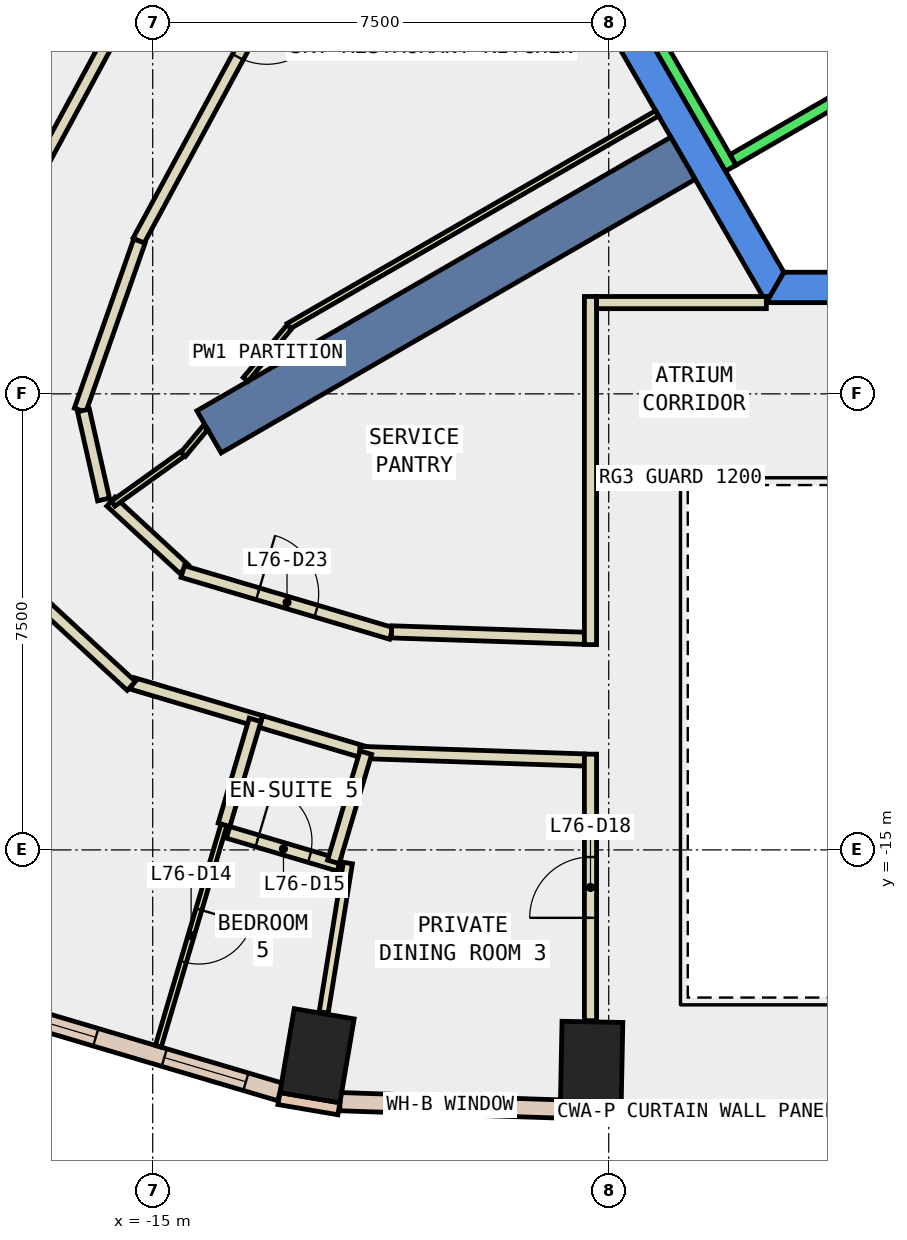
"""IFC4 building model, lengths in metres.
Left out: names, types, materials, properties, quantities, classifications, styles, units other than length and angle.
Written with IfcOpenShell. Run it as: python <this file> out.ifc"""

import sys

from ifc_helpers import new_model, si_unit, direction, frame, frame_2d, origin, origin_2d, place, context, subcontext, project, spatial, polyline, rectangle, outline, extrude, element, fill, save


model = new_model("IFC4")
c1 = context("Model", 3, precision=1e-05, world=origin(), true_north=direction((0.0, 1.0)))
c2 = subcontext(c1, "Body", "Model", "MODEL_VIEW")
j1 = project(units=[si_unit("LENGTHUNIT", "METRE"), si_unit("PLANEANGLEUNIT", "RADIAN")], contexts=[c1])
p1 = place(None, origin())
s1 = spatial("IfcSite", under=j1, at=p1, CompositionType="ELEMENT")
p2 = place(p1, origin())
s2 = spatial("IfcBuilding", under=s1, at=p2, CompositionType="ELEMENT")
p3 = place(p2, frame((0.0, 0.0, 322.4)))
s3 = spatial("IfcBuildingStorey", under=s2, at=p3, CompositionType="ELEMENT", Elevation=322.4)
for number, where, z_axis, x_axis in (
    (1, (-12.297, -18.385, -0.34), (0.0, 0.0, 1.0), (-0.986, 0.168, 0.0)),
    (2, (-7.782, -18.528, -0.34), (0.0, 0.0, 1.0), (-1.0, 0.02, 0.0)),
):
    element("IfcColumn", number, at=place(p3, frame(where, z_axis=z_axis, x_axis=x_axis)), inside=s3, PredefinedType="COLUMN", context=c2, shape_type="SweptSolid", body=[
        extrude(rectangle(XDim=1.0, YDim=1.4, at=origin_2d()), origin(), (0.0, 0.0, 1.0), 3.34),
    ])
p4 = place(p3, frame((0.0, 0.0, -0.34)))
e3 = element("IfcWall", 3, at=p4, inside=s3, PredefinedType="SHEAR", context=c2, shape_type="SweptSolid", body=[
    extrude(outline(polyline([(-9.815, 2.5), (-4.907, -6.0), (-4.619, -5.5), (-9.238, 2.5), (-9.815, 2.5)])), origin(), (0.0, 0.0, 1.0), 3.34),
])
p5 = place(p3, frame((0.0, 0.0, -0.34)))
e4 = element("IfcWall", 4, at=p5, inside=s3, PredefinedType="SHEAR", context=c2, shape_type="SweptSolid", body=[
    extrude(outline(polyline([(3.75, -6.0), (3.75, -5.5), (-4.619, -5.5), (-4.907, -6.0), (3.75, -6.0)])), origin(), (0.0, 0.0, 1.0), 3.34),
])
p6 = place(p3, frame((-6.279, -3.625, -0.34), z_axis=(0.0, 0.0, 1.0), x_axis=(-0.866017533419, -0.500013631625, 0.0)))
e5 = element("IfcWall", 5, at=p6, inside=s3, PredefinedType="SHEAR", context=c2, shape_type="SweptSolid", body=[
    extrude(rectangle(XDim=9.0, YDim=0.8, at=frame_2d((4.5, 0.0))), origin(), (0.0, 0.0, 1.0), 3.34),
])
for number, where, z_axis, x_axis in (
    (6, (-12.924, -19.089, 0.0), (0.0, 0.0, 1.0), (0.986, -0.168, 0.0)),
    (7, (-8.298, -19.318, 0.0), (0.0, 0.0, 1.0), (1.0, -0.02, 0.0)),
):
    element("IfcWall", number, at=place(p3, frame(where, z_axis=z_axis, x_axis=x_axis)), inside=s3, PredefinedType="STANDARD", context=c2, shape_type="SweptSolid", body=[
        extrude(rectangle(XDim=1.0, YDim=0.2, at=frame_2d((0.5, 0.0))), origin(), (0.0, 0.0, 1.0), 3.0),
    ])
p7 = place(p3, frame((-11.919, -19.14, 0.0), z_axis=(0.0, 0.0, 1.0), x_axis=(0.999441913039, -0.033404527552, 0.0)))
e8 = element("IfcWall", 8, at=p7, inside=s3, PredefinedType="STANDARD", context=c2, shape_type="SweptSolid", body=[
    extrude(rectangle(XDim=3.625, YDim=0.3, at=frame_2d((1.812, 0.0))), origin(), (0.0, 0.0, 1.0), 3.0),
])
p8 = place(p7, frame((1.113, 0.0, 0.9)))
e9 = element("IfcOpeningElement", 9, at=p8, cuts=e8, PredefinedType="OPENING", context=c2, shape_type="SweptSolid", body=[
    extrude(rectangle(XDim=1.4, YDim=2.0, at=frame_2d((0.7, 1.0))), frame((0.0, 0.16, 0.0), z_axis=(0.0, -1.0, 0.0), x_axis=(1.0, 0.0, 0.0)), (0.0, 0.0, 1.0), 0.32),
])
p9 = place(p3, frame((-17.842, -17.516, 0.0), z_axis=(0.0, 0.0, 1.0), x_axis=(0.958757933751, -0.284223898486, 0.0)))
e10 = element("IfcWall", 10, at=p9, inside=s3, PredefinedType="STANDARD", context=c2, shape_type="SweptSolid", body=[
    extrude(rectangle(XDim=5.15, YDim=0.3, at=frame_2d((2.575, 0.0))), origin(), (0.0, 0.0, 1.0), 3.0),
])
p10 = place(p9, frame((0.588, 0.0, 0.9)))
e11 = element("IfcOpeningElement", 11, at=p10, cuts=e10, PredefinedType="OPENING", context=c2, shape_type="SweptSolid", body=[
    extrude(rectangle(XDim=1.4, YDim=2.0, at=frame_2d((0.7, 1.0))), frame((0.0, 0.16, 0.0), z_axis=(0.0, -1.0, 0.0), x_axis=(1.0, 0.0, 0.0)), (0.0, 0.0, 1.0), 0.32),
])
p11 = place(p9, frame((3.163, 0.0, 0.9)))
e12 = element("IfcOpeningElement", 12, at=p11, cuts=e10, PredefinedType="OPENING", context=c2, shape_type="SweptSolid", body=[
    extrude(rectangle(XDim=1.4, YDim=2.0, at=frame_2d((0.7, 1.0))), frame((0.0, 0.16, 0.0), z_axis=(0.0, -1.0, 0.0), x_axis=(1.0, 0.0, 0.0)), (0.0, 0.0, 1.0), 0.32),
])
p12 = place(p3, frame((-11.489, 1.942, 0.0), z_axis=(0.0, 0.0, 1.0), x_axis=(-0.475643534049, -0.879638123615, 0.0)))
e13 = element("IfcWall", 13, at=p12, inside=s3, PredefinedType="PARTITIONING", context=c2, shape_type="SweptSolid", body=[
    extrude(rectangle(XDim=7.871, YDim=0.2, at=frame_2d((3.936, 0.0))), origin(), (0.0, 0.0, 1.0), 3.0),
])
p13 = place(p12, frame((3.436, 0.0, 0.0)))
e14 = element("IfcOpeningElement", 14, at=p13, cuts=e13, PredefinedType="OPENING", context=c2, shape_type="SweptSolid", body=[
    extrude(rectangle(XDim=1.0, YDim=2.1, at=frame_2d((0.5, 1.05))), frame((0.0, 0.11, 0.0), z_axis=(0.0, -1.0, 0.0), x_axis=(1.0, 0.0, 0.0)), (0.0, 0.0, 1.0), 0.22),
])
p14 = place(p3, frame((-15.219, -4.988, 0.0), z_axis=(0.0, 0.0, 1.0), x_axis=(-0.330981563235, -0.943637220969, 0.0)))
e15 = element("IfcWall", 15, at=p14, inside=s3, PredefinedType="PARTITIONING", context=c2, shape_type="SweptSolid", body=[
    extrude(rectangle(XDim=2.946, YDim=0.2, at=frame_2d((1.473, 0.0))), origin(), (0.0, 0.0, 1.0), 3.0),
])
p15 = place(p3, frame((-16.139, -7.772, 0.0), z_axis=(0.0, 0.0, 1.0), x_axis=(0.220111291919, -0.975474766034, 0.0)))
e16 = element("IfcWall", 16, at=p15, inside=s3, PredefinedType="PARTITIONING", context=c2, shape_type="SweptSolid", body=[
    extrude(rectangle(XDim=1.503, YDim=0.2, at=frame_2d((0.751, 0.0))), origin(), (0.0, 0.0, 1.0), 3.0),
])
p16 = place(p3, frame((-15.687, -9.272, 0.0), z_axis=(0.0, 0.0, 1.0), x_axis=(0.734946370973, -0.67812523312, 0.0)))
e17 = element("IfcWall", 17, at=p16, inside=s3, PredefinedType="PARTITIONING", context=c2, shape_type="SweptSolid", body=[
    extrude(rectangle(XDim=1.637, YDim=0.2, at=frame_2d((0.818, 0.0))), origin(), (0.0, 0.0, 1.0), 3.0),
])
p17 = place(p3, frame((-14.506, -10.422, 0.0), z_axis=(0.0, 0.0, 1.0), x_axis=(0.958760241353, -0.284216114252, 0.0)))
e18 = element("IfcWall", 18, at=p17, inside=s3, PredefinedType="PARTITIONING", context=c2, shape_type="SweptSolid", body=[
    extrude(rectangle(XDim=3.578, YDim=0.2, at=frame_2d((1.789, 0.0))), origin(), (0.0, 0.0, 1.0), 3.0),
])
p18 = place(p17, frame((1.289, 0.0, 0.0)))
e19 = element("IfcOpeningElement", 19, at=p18, cuts=e18, PredefinedType="OPENING", context=c2, shape_type="SweptSolid", body=[
    extrude(rectangle(XDim=1.0, YDim=2.1, at=frame_2d((0.5, 1.05))), frame((0.0, 0.11, 0.0), z_axis=(0.0, -1.0, 0.0), x_axis=(1.0, 0.0, 0.0)), (0.0, 0.0, 1.0), 0.22),
])
p19 = place(p3, frame((-11.072, -11.414, 0.0), z_axis=(0.0, 0.0, 1.0), x_axis=(0.999442599499, -0.033383982774, 0.0)))
e20 = element("IfcWall", 20, at=p19, inside=s3, PredefinedType="PARTITIONING", context=c2, shape_type="SweptSolid", body=[
    extrude(rectangle(XDim=3.174, YDim=0.2, at=frame_2d((1.587, 0.0))), origin(), (0.0, 0.0, 1.0), 3.0),
])
p20 = place(p3, frame((-17.068, -4.17, 0.0), z_axis=(0.0, 0.0, 1.0), x_axis=(0.475681790703, 0.879617436158, 0.0)))
e21 = element("IfcWall", 21, at=p20, inside=s3, PredefinedType="PARTITIONING", context=c2, shape_type="SweptSolid", body=[
    extrude(rectangle(XDim=8.058, YDim=0.2, at=frame_2d((4.029, 0.0))), origin(), (0.0, 0.0, 1.0), 3.0),
])
p21 = place(p20, frame((3.529, 0.0, 0.0)))
e22 = element("IfcOpeningElement", 22, at=p21, cuts=e21, PredefinedType="OPENING", context=c2, shape_type="SweptSolid", body=[
    extrude(rectangle(XDim=1.0, YDim=2.1, at=frame_2d((0.5, 1.05))), frame((0.0, 0.11, 0.0), z_axis=(0.0, -1.0, 0.0), x_axis=(1.0, 0.0, 0.0)), (0.0, 0.0, 1.0), 0.22),
])
p22 = place(p3, frame((-13.22, -12.889, 0.0), z_axis=(0.0, 0.0, 1.0), x_axis=(-0.958789155152, 0.284118559693, 0.0)))
e23 = element("IfcWall", 23, at=p22, inside=s3, PredefinedType="PARTITIONING", context=c2, shape_type="SweptSolid", body=[
    extrude(rectangle(XDim=2.2, YDim=0.2, at=frame_2d((1.1, 0.0))), origin(), (0.0, 0.0, 1.0), 3.0),
])
p23 = place(p3, frame((-15.352, -12.303, 0.0), z_axis=(0.0, 0.0, 1.0), x_axis=(-0.734786003021, 0.67829899732, 0.0)))
e24 = element("IfcWall", 24, at=p23, inside=s3, PredefinedType="PARTITIONING", context=c2, shape_type="SweptSolid", body=[
    extrude(rectangle(XDim=3.22, YDim=0.2, at=frame_2d((1.61, 0.0))), origin(), (0.0, 0.0, 1.0), 3.0),
])
p24 = place(p3, frame((-11.495, -13.401, 0.0), z_axis=(0.0, 0.0, 1.0), x_axis=(-0.958662482938, 0.284545679649, 0.0)))
e25 = element("IfcWall", 25, at=p24, inside=s3, PredefinedType="PARTITIONING", context=c2, shape_type="SweptSolid", body=[
    extrude(rectangle(XDim=1.799, YDim=0.2, at=frame_2d((0.9, 0.0))), origin(), (0.0, 0.0, 1.0), 3.0),
])
p25 = place(p3, frame((-7.9, -13.521, 0.0), z_axis=(0.0, 0.0, 1.0), x_axis=(-0.999437184802, 0.033545694739, 0.0)))
e26 = element("IfcWall", 26, at=p25, inside=s3, PredefinedType="PARTITIONING", context=c2, shape_type="SweptSolid", body=[
    extrude(rectangle(XDim=3.697, YDim=0.2, at=frame_2d((1.849, 0.0))), origin(), (0.0, 0.0, 1.0), 3.0),
])
p26 = place(p3, frame((-7.8, -11.624, 0.0), z_axis=(0.0, 0.0, 1.0), x_axis=(0.0, 1.0, 0.0)))
e27 = element("IfcWall", 27, at=p26, inside=s3, PredefinedType="PARTITIONING", context=c2, shape_type="SweptSolid", body=[
    extrude(rectangle(XDim=5.725, YDim=0.2, at=frame_2d((2.863, 0.0))), origin(), (0.0, 0.0, 1.0), 3.0),
])
p27 = place(p3, frame((-7.7, -5.999, 0.0), z_axis=(0.0, 0.0, 1.0), x_axis=(1.0, 0.0, 0.0)))
e28 = element("IfcWall", 28, at=p27, inside=s3, PredefinedType="PARTITIONING", context=c2, shape_type="SweptSolid", body=[
    extrude(rectangle(XDim=2.792, YDim=0.2, at=frame_2d((1.396, 0.0))), origin(), (0.0, 0.0, 1.0), 3.0),
])
p28 = place(p3, frame((-7.8, -17.808, 0.0), z_axis=(0.0, 0.0, 1.0), x_axis=(0.0, 1.0, 0.0)))
e29 = element("IfcWall", 29, at=p28, inside=s3, PredefinedType="PARTITIONING", context=c2, shape_type="SweptSolid", body=[
    extrude(rectangle(XDim=4.383, YDim=0.2, at=frame_2d((2.191, 0.0))), origin(), (0.0, 0.0, 1.0), 3.0),
])
p29 = place(p28, frame((1.691, 0.0, 0.0)))
e30 = element("IfcOpeningElement", 30, at=p29, cuts=e29, PredefinedType="OPENING", context=c2, shape_type="SweptSolid", body=[
    extrude(rectangle(XDim=1.0, YDim=2.1, at=frame_2d((0.5, 1.05))), frame((0.0, 0.11, 0.0), z_axis=(0.0, -1.0, 0.0), x_axis=(1.0, 0.0, 0.0)), (0.0, 0.0, 1.0), 0.22),
])
p30 = place(p3, frame((-6.705, -2.887, 0.0), z_axis=(0.0, 0.0, 1.0), x_axis=(-0.866001397039, -0.500041578597, 0.0)))
e31 = element("IfcWall", 31, at=p30, inside=s3, PredefinedType="PARTITIONING", context=c2, shape_type="SweptSolid", body=[
    extrude(rectangle(XDim=6.998, YDim=0.1, at=frame_2d((3.499, 0.0))), origin(), (0.0, 0.0, 1.0), 3.0),
])
p31 = place(p3, frame((-12.753, -6.399, 0.0), z_axis=(0.0, 0.0, 1.0), x_axis=(-0.640077503072, -0.768310347491, 0.0)))
e32 = element("IfcWall", 32, at=p31, inside=s3, PredefinedType="PARTITIONING", context=c2, shape_type="SweptSolid", body=[
    extrude(rectangle(XDim=1.123, YDim=0.1, at=frame_2d((0.562, 0.0))), origin(), (0.0, 0.0, 1.0), 3.0),
])
p32 = place(p3, frame((-14.507, -8.486, 0.0), z_axis=(0.0, 0.0, 1.0), x_axis=(-0.812782900134, -0.582566697684, 0.0)))
e33 = element("IfcWall", 33, at=p32, inside=s3, PredefinedType="PARTITIONING", context=c2, shape_type="SweptSolid", body=[
    extrude(rectangle(XDim=1.407, YDim=0.1, at=frame_2d((0.704, 0.0))), origin(), (0.0, 0.0, 1.0), 3.0),
])
p33 = place(p3, frame((-13.828, -14.587, 0.0), z_axis=(0.0, 0.0, 1.0), x_axis=(-0.284245833657, -0.958751430794, 0.0)))
e34 = element("IfcWall", 34, at=p33, inside=s3, PredefinedType="PARTITIONING", context=c2, shape_type="SweptSolid", body=[
    extrude(rectangle(XDim=3.8, YDim=0.1, at=frame_2d((1.9, 0.0))), origin(), (0.0, 0.0, 1.0), 3.0),
])
p34 = place(p33, frame((1.45, 0.0, 0.0)))
e35 = element("IfcOpeningElement", 35, at=p34, cuts=e34, PredefinedType="OPENING", context=c2, shape_type="SweptSolid", body=[
    extrude(rectangle(XDim=0.9, YDim=2.1, at=frame_2d((0.45, 1.05))), frame((0.0, 0.06, 0.0), z_axis=(0.0, -1.0, 0.0), x_axis=(1.0, 0.0, 0.0)), (0.0, 0.0, 1.0), 0.12),
])
p35 = place(p3, frame((-13.316, -12.861, 0.0), z_axis=(0.0, 0.0, 1.0), x_axis=(-0.283898972531, -0.958854198195, 0.0)))
e36 = element("IfcWall", 36, at=p35, inside=s3, PredefinedType="PARTITIONING", context=c2, shape_type="SweptSolid", body=[
    extrude(rectangle(XDim=1.8, YDim=0.2, at=frame_2d((0.9, 0.0))), origin(), (0.0, 0.0, 1.0), 3.0),
])
p36 = place(p3, frame((-13.76, -14.711, 0.0), z_axis=(0.0, 0.0, 1.0), x_axis=(0.958772187895, -0.284175811285, 0.0)))
e37 = element("IfcWall", 37, at=p36, inside=s3, PredefinedType="PARTITIONING", context=c2, shape_type="SweptSolid", body=[
    extrude(rectangle(XDim=1.9, YDim=0.2, at=frame_2d((0.95, 0.0))), origin(), (0.0, 0.0, 1.0), 3.0),
])
p37 = place(p36, frame((0.5, 0.0, 0.0)))
e38 = element("IfcOpeningElement", 38, at=p37, cuts=e37, PredefinedType="OPENING", context=c2, shape_type="SweptSolid", body=[
    extrude(rectangle(XDim=0.9, YDim=2.1, at=frame_2d((0.45, 1.05))), frame((0.0, 0.11, 0.0), z_axis=(0.0, -1.0, 0.0), x_axis=(1.0, 0.0, 0.0)), (0.0, 0.0, 1.0), 0.22),
])
p38 = place(p3, frame((-11.79, -15.216, 0.0), z_axis=(0.0, 0.0, 1.0), x_axis=(-0.159880010227, -0.98713645578, 0.0)))
e39 = element("IfcWall", 39, at=p38, inside=s3, PredefinedType="PARTITIONING", context=c2, shape_type="SweptSolid", body=[
    extrude(rectangle(XDim=2.489, YDim=0.15, at=frame_2d((1.245, 0.0))), origin(), (0.0, 0.0, 1.0), 3.0),
])
p39 = place(p3, frame((-11.495, -13.401, 0.0), z_axis=(0.0, 0.0, 1.0), x_axis=(-0.284465432667, -0.958686297815, 0.0)))
e40 = element("IfcWall", 40, at=p39, inside=s3, PredefinedType="PARTITIONING", context=c2, shape_type="SweptSolid", body=[
    extrude(rectangle(XDim=1.874, YDim=0.2, at=frame_2d((0.937, 0.0))), origin(), (0.0, 0.0, 1.0), 3.0),
])
p40 = place(p3, frame((-14.133, -8.056, 0.0), z_axis=(0.0, 0.0, 1.0), x_axis=(-0.640142394154, -0.768256282244, 0.0)))
e41 = element("IfcWall", 41, at=p40, inside=s3, PredefinedType="PARTITIONING", context=c2, shape_type="SweptSolid", body=[
    extrude(rectangle(XDim=0.572, YDim=0.1, at=frame_2d((0.286, 0.0))), origin(), (0.0, 0.0, 1.0), 3.0),
])
p41 = place(p3, frame((-5.94, 2.188, 0.0), z_axis=(0.0, 0.0, 1.0), x_axis=(0.500034260056, -0.866005622828, 0.0)))
e42 = element("IfcWall", 42, at=p41, inside=s3, PredefinedType="STANDARD", context=c2, shape_type="SweptSolid", body=[
    extrude(rectangle(XDim=5.399, YDim=0.2, at=frame_2d((2.7, 0.0))), origin(), (0.0, 0.0, 1.0), 3.0),
])
p42 = place(p41, frame((3.075, 0.0, 0.0)))
e43 = element("IfcOpeningElement", 43, at=p42, cuts=e42, PredefinedType="OPENING", context=c2, shape_type="SweptSolid", body=[
    extrude(rectangle(XDim=1.1, YDim=2.1, at=frame_2d((0.55, 1.05))), frame((0.0, 0.11, 0.0), z_axis=(0.0, -1.0, 0.0), x_axis=(1.0, 0.0, 0.0)), (0.0, 0.0, 1.0), 0.22),
])
p43 = place(p41, frame((1.225, 0.0, 0.0)))
e44 = element("IfcOpeningElement", 44, at=p43, cuts=e42, PredefinedType="OPENING", context=c2, shape_type="SweptSolid", body=[
    extrude(rectangle(XDim=1.1, YDim=2.1, at=frame_2d((0.55, 1.05))), frame((0.0, 0.11, 0.0), z_axis=(0.0, -1.0, 0.0), x_axis=(1.0, 0.0, 0.0)), (0.0, 0.0, 1.0), 0.22),
])
p44 = place(p3, frame((-8.192, 0.888, 0.0), z_axis=(0.0, 0.0, 1.0), x_axis=(0.500034260056, -0.866005622828, 0.0)))
e45 = element("IfcWall", 45, at=p44, inside=s3, PredefinedType="STANDARD", context=c2, shape_type="SweptSolid", body=[
    extrude(rectangle(XDim=5.399, YDim=0.2, at=frame_2d((2.7, 0.0))), origin(), (0.0, 0.0, 1.0), 3.0),
])
p45 = place(p3, frame((-3.377, -2.452, 0.0), z_axis=(0.0, 0.0, 1.0), x_axis=(-0.865955154139, -0.50012165622, 0.0)))
e46 = element("IfcWall", 46, at=p45, inside=s3, PredefinedType="STANDARD", context=c2, shape_type="SweptSolid", body=[
    extrude(rectangle(XDim=2.4, YDim=0.2, at=frame_2d((1.2, 0.0))), origin(), (0.0, 0.0, 1.0), 3.0),
])
p46 = place(p8, origin())
e47 = element("IfcWindow", 47, at=p46, inside=s3, PartitioningType="SINGLE_PANEL", PredefinedType="WINDOW", context=c2, shape_type="SweptSolid", body=[
    extrude(rectangle(XDim=1.4, YDim=2.0, at=frame_2d((0.7, 1.0))), frame((0.0, 0.03, 0.0), z_axis=(0.0, -1.0, 0.0), x_axis=(1.0, 0.0, 0.0)), (0.0, 0.0, 1.0), 0.06),
])
fill(e9, e47)
p47 = place(p10, origin())
e48 = element("IfcWindow", 48, at=p47, inside=s3, PartitioningType="SINGLE_PANEL", PredefinedType="WINDOW", context=c2, shape_type="SweptSolid", body=[
    extrude(rectangle(XDim=1.4, YDim=2.0, at=frame_2d((0.7, 1.0))), frame((0.0, 0.03, 0.0), z_axis=(0.0, -1.0, 0.0), x_axis=(1.0, 0.0, 0.0)), (0.0, 0.0, 1.0), 0.06),
])
fill(e11, e48)
p48 = place(p11, origin())
e49 = element("IfcWindow", 49, at=p48, inside=s3, PartitioningType="SINGLE_PANEL", PredefinedType="WINDOW", context=c2, shape_type="SweptSolid", body=[
    extrude(rectangle(XDim=1.4, YDim=2.0, at=frame_2d((0.7, 1.0))), frame((0.0, 0.03, 0.0), z_axis=(0.0, -1.0, 0.0), x_axis=(1.0, 0.0, 0.0)), (0.0, 0.0, 1.0), 0.06),
])
fill(e12, e49)
p49 = place(p34, origin())
e50 = element("IfcDoor", 50, at=p49, inside=s3, OperationType="SINGLE_SWING_RIGHT", PredefinedType="DOOR", context=c2, shape_type="SweptSolid", body=[
    extrude(rectangle(XDim=0.9, YDim=2.1, at=frame_2d((0.45, 1.05))), frame((0.0, 0.025, 0.0), z_axis=(0.0, -1.0, 0.0), x_axis=(1.0, 0.0, 0.0)), (0.0, 0.0, 1.0), 0.05),
])
fill(e35, e50)
p50 = place(p37, origin())
e51 = element("IfcDoor", 51, at=p50, inside=s3, OperationType="SINGLE_SWING_LEFT", PredefinedType="DOOR", context=c2, shape_type="SweptSolid", body=[
    extrude(rectangle(XDim=0.9, YDim=2.1, at=frame_2d((0.45, 1.05))), frame((0.0, 0.025, 0.0), z_axis=(0.0, -1.0, 0.0), x_axis=(1.0, 0.0, 0.0)), (0.0, 0.0, 1.0), 0.05),
])
fill(e38, e51)
p51 = place(p29, origin())
e52 = element("IfcDoor", 52, at=p51, inside=s3, OperationType="SINGLE_SWING_LEFT", PredefinedType="DOOR", context=c2, shape_type="SweptSolid", body=[
    extrude(rectangle(XDim=1.0, YDim=2.1, at=frame_2d((0.5, 1.05))), frame((0.0, 0.025, 0.0), z_axis=(0.0, -1.0, 0.0), x_axis=(1.0, 0.0, 0.0)), (0.0, 0.0, 1.0), 0.05),
])
fill(e30, e52)
p52 = place(p13, origin())
e53 = element("IfcDoor", 53, at=p52, inside=s3, OperationType="SINGLE_SWING_LEFT", PredefinedType="DOOR", context=c2, shape_type="SweptSolid", body=[
    extrude(rectangle(XDim=1.0, YDim=2.1, at=frame_2d((0.5, 1.05))), frame((0.0, 0.025, 0.0), z_axis=(0.0, -1.0, 0.0), x_axis=(1.0, 0.0, 0.0)), (0.0, 0.0, 1.0), 0.05),
])
fill(e14, e53)
p53 = place(p18, origin())
e54 = element("IfcDoor", 54, at=p53, inside=s3, OperationType="SINGLE_SWING_RIGHT", PredefinedType="DOOR", context=c2, shape_type="SweptSolid", body=[
    extrude(rectangle(XDim=1.0, YDim=2.1, at=frame_2d((0.5, 1.05))), frame((0.0, 0.025, 0.0), z_axis=(0.0, -1.0, 0.0), x_axis=(1.0, 0.0, 0.0)), (0.0, 0.0, 1.0), 0.05),
])
fill(e19, e54)
save(model, sys.argv[1])
